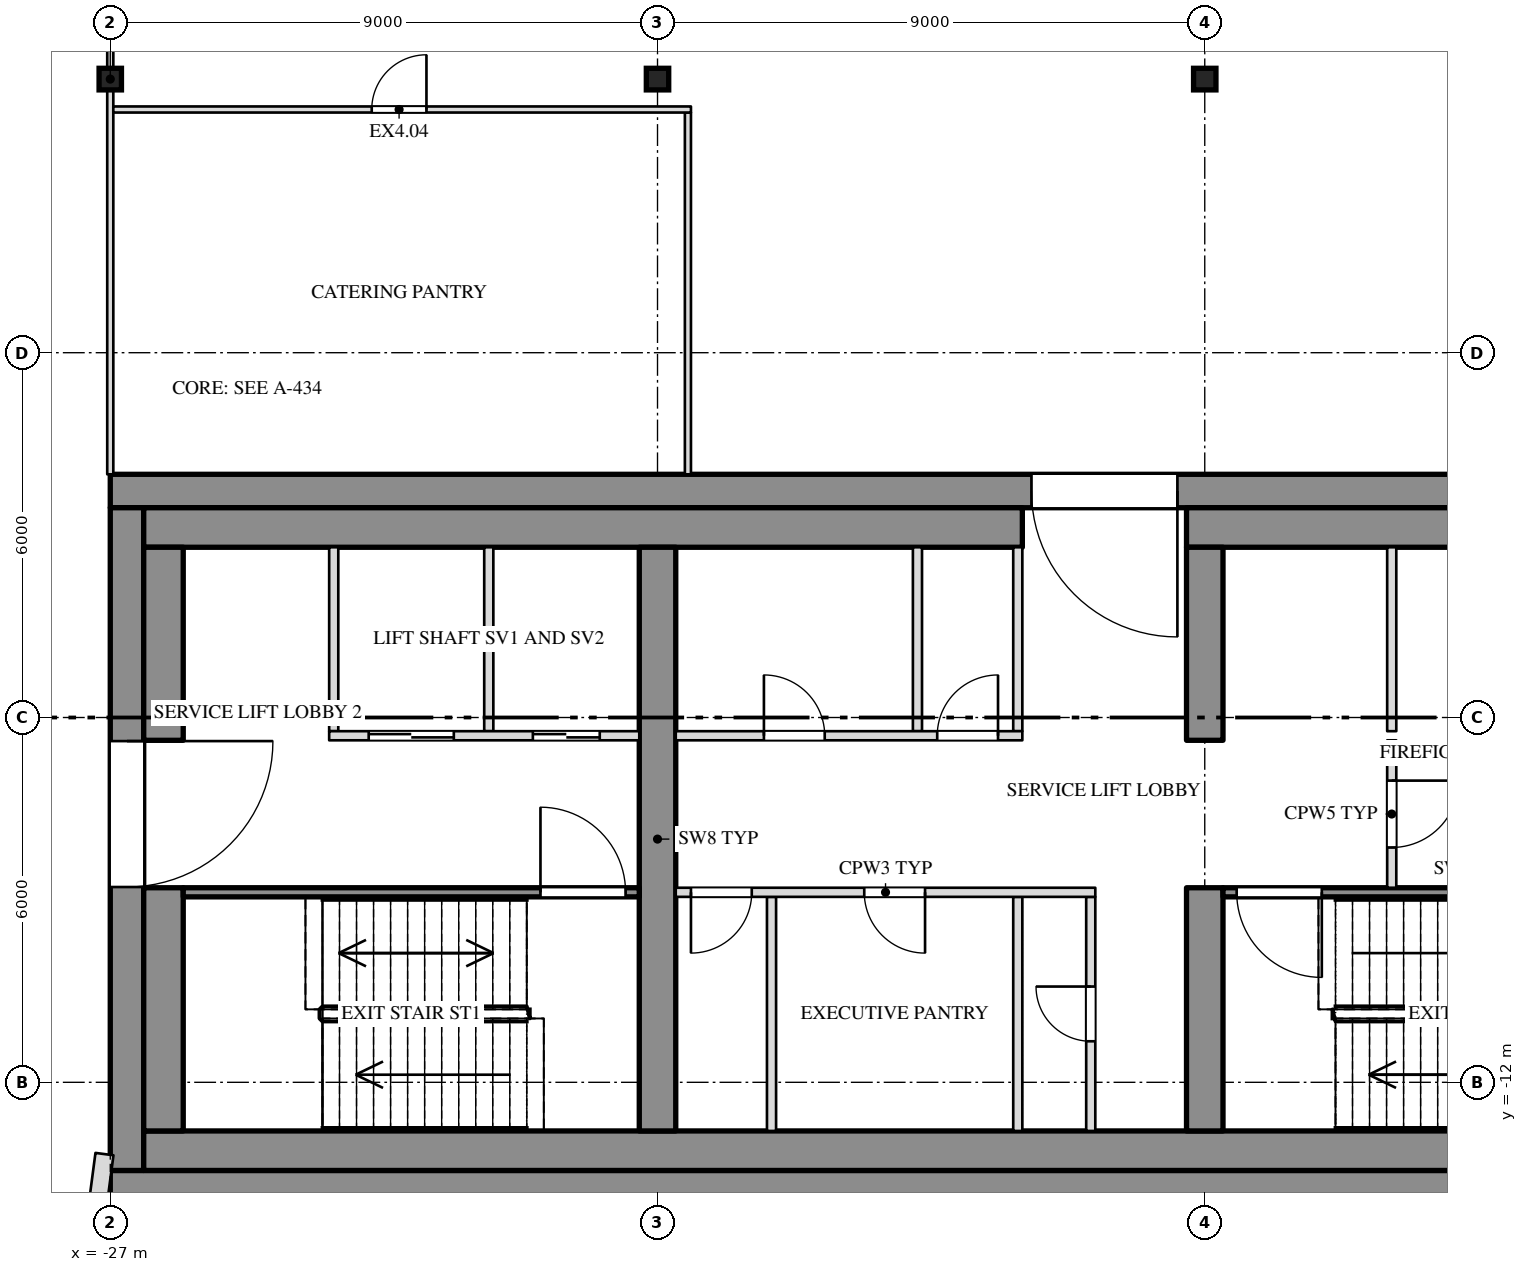
"""IFC4 building model, lengths in metres.
Left out: names, types, materials, properties, quantities, classifications, styles, units other than length and angle.
Written with IfcOpenShell. Run it as: python <this file> out.ifc"""

import sys

from ifc_helpers import new_model, si_unit, direction, frame, frame_2d, origin, origin_2d, place, context, subcontext, project, spatial, rectangle, i_section, extrude, element, fill, save


model = new_model("IFC4")
c1 = context("Model", 3, precision=1e-05, world=origin(), true_north=direction((0.0, 1.0)))
c2 = subcontext(c1, "Body", "Model", "MODEL_VIEW")
j1 = project(units=[si_unit("LENGTHUNIT", "METRE"), si_unit("PLANEANGLEUNIT", "RADIAN")], contexts=[c1])
p1 = place(None, origin())
s1 = spatial("IfcSite", under=j1, at=p1, CompositionType="ELEMENT")
p2 = place(p1, origin())
s2 = spatial("IfcBuilding", under=s1, at=p2, CompositionType="ELEMENT")
p3 = place(p2, frame((0.0, 0.0, 284.5)))
s3 = spatial("IfcBuildingStorey", under=s2, at=p3, CompositionType="ELEMENT", Elevation=284.5)
for number, where, z_axis, x_axis in (
    (1, (-27.0, 4.5, 0.0), (0.0, 0.0, 1.0), (1.0, 0.0, 0.0)),
    (2, (-18.0, 4.5, 0.0), (0.0, 0.0, 1.0), (1.0, 0.0, 0.0)),
    (3, (-9.0, 4.5, 0.0), (0.0, 0.0, 1.0), (1.0, 0.0, 0.0)),
):
    element("IfcColumn", number, at=place(p3, frame(where, z_axis=z_axis, x_axis=x_axis)), inside=s3, PredefinedType="COLUMN", context=c2, shape_type="SweptSolid", body=[
        extrude(i_section(OverallWidth=0.368, OverallDepth=0.356, WebThickness=0.011, FlangeThickness=0.018, at=origin_2d()), origin(), (0.0, 0.0, 1.0), 4.0),
    ])
p4 = place(p3, frame((-27.0, -2.275, 0.0), z_axis=(0.0, 0.0, 1.0), x_axis=(1.0, 0.0, 0.0)))
e4 = element("IfcWall", 4, at=p4, inside=s3, PredefinedType="SHEAR", context=c2, shape_type="SweptSolid", body=[
    extrude(rectangle(XDim=54.0, YDim=0.55, at=frame_2d((27.0, 0.0))), origin(), (0.0, 0.0, 1.0), 3.78),
])
p5 = place(p4, frame((15.15, 0.0, 0.0)))
e5 = element("IfcOpeningElement", 5, at=p5, cuts=e4, PredefinedType="OPENING", context=c2, shape_type="SweptSolid", body=[
    extrude(rectangle(XDim=2.4, YDim=2.1, at=frame_2d((1.2, 1.05))), frame((0.0, 0.287, 0.0), z_axis=(0.0, -1.0, 0.0), x_axis=(1.0, 0.0, 0.0)), (0.0, 0.0, 1.0), 0.574),
])
p6 = place(p4, frame((36.45, 0.0, 0.0)))
e6 = element("IfcOpeningElement", 6, at=p6, cuts=e4, PredefinedType="OPENING", context=c2, shape_type="SweptSolid", body=[
    extrude(rectangle(XDim=2.4, YDim=2.1, at=frame_2d((1.2, 1.05))), frame((0.0, 0.287, 0.0), z_axis=(0.0, -1.0, 0.0), x_axis=(1.0, 0.0, 0.0)), (0.0, 0.0, 1.0), 0.574),
])
p7 = place(p3, frame((-27.0, -13.725, 0.0), z_axis=(0.0, 0.0, 1.0), x_axis=(1.0, 0.0, 0.0)))
e7 = element("IfcWall", 7, at=p7, inside=s3, PredefinedType="SHEAR", context=c2, shape_type="SweptSolid", body=[
    extrude(rectangle(XDim=54.0, YDim=0.55, at=frame_2d((27.0, 0.0))), origin(), (0.0, 0.0, 1.0), 3.78),
])
p8 = place(p3, frame((-26.725, -13.45, 0.0), z_axis=(0.0, 0.0, 1.0), x_axis=(0.0, 1.0, 0.0)))
e8 = element("IfcWall", 8, at=p8, inside=s3, PredefinedType="SHEAR", context=c2, shape_type="SweptSolid", body=[
    extrude(rectangle(XDim=10.9, YDim=0.55, at=frame_2d((5.45, 0.0))), origin(), (0.0, 0.0, 1.0), 3.78),
])
p9 = place(p8, frame((4.662, 0.0, 0.0)))
e9 = element("IfcOpeningElement", 9, at=p9, cuts=e8, PredefinedType="OPENING", context=c2, shape_type="SweptSolid", body=[
    extrude(rectangle(XDim=2.4, YDim=2.1, at=frame_2d((1.2, 1.05))), frame((0.0, 0.287, 0.0), z_axis=(0.0, -1.0, 0.0), x_axis=(1.0, 0.0, 0.0)), (0.0, 0.0, 1.0), 0.574),
])
p10 = place(p3, frame((-26.45, -2.875, 0.0), z_axis=(0.0, 0.0, 1.0), x_axis=(1.0, 0.0, 0.0)))
e10 = element("IfcWall", 10, at=p10, inside=s3, PredefinedType="SHEAR", context=c2, shape_type="SweptSolid", body=[
    extrude(rectangle(XDim=14.45, YDim=0.65, at=frame_2d((7.225, 0.0))), origin(), (0.0, 0.0, 1.0), 3.78),
])
p11 = place(p3, frame((-9.3, -2.875, 0.0), z_axis=(0.0, 0.0, 1.0), x_axis=(1.0, 0.0, 0.0)))
e11 = element("IfcWall", 11, at=p11, inside=s3, PredefinedType="SHEAR", context=c2, shape_type="SweptSolid", body=[
    extrude(rectangle(XDim=18.6, YDim=0.65, at=frame_2d((9.3, 0.0))), origin(), (0.0, 0.0, 1.0), 3.78),
])
p12 = place(p3, frame((-26.45, -13.125, 0.0), z_axis=(0.0, 0.0, 1.0), x_axis=(1.0, 0.0, 0.0)))
e12 = element("IfcWall", 12, at=p12, inside=s3, PredefinedType="SHEAR", context=c2, shape_type="SweptSolid", body=[
    extrude(rectangle(XDim=52.9, YDim=0.65, at=frame_2d((26.45, 0.0))), origin(), (0.0, 0.0, 1.0), 3.78),
])
p13 = place(p3, frame((-26.125, -12.8, 0.0), z_axis=(0.0, 0.0, 1.0), x_axis=(0.0, 1.0, 0.0)))
e13 = element("IfcWall", 13, at=p13, inside=s3, PredefinedType="SHEAR", context=c2, shape_type="SweptSolid", body=[
    extrude(rectangle(XDim=4.0, YDim=0.65, at=frame_2d((2.0, 0.0))), origin(), (0.0, 0.0, 1.0), 3.78),
])
p14 = place(p3, frame((-26.125, -6.375, 0.0), z_axis=(0.0, 0.0, 1.0), x_axis=(0.0, 1.0, 0.0)))
e14 = element("IfcWall", 14, at=p14, inside=s3, PredefinedType="SHEAR", context=c2, shape_type="SweptSolid", body=[
    extrude(rectangle(XDim=3.175, YDim=0.65, at=frame_2d((1.587, 0.0))), origin(), (0.0, 0.0, 1.0), 3.78),
])
p15 = place(p3, frame((-18.0, -12.8, 0.0), z_axis=(0.0, 0.0, 1.0), x_axis=(0.0, 1.0, 0.0)))
e15 = element("IfcWall", 15, at=p15, inside=s3, PredefinedType="SHEAR", context=c2, shape_type="SweptSolid", body=[
    extrude(rectangle(XDim=9.6, YDim=0.6, at=frame_2d((4.8, 0.0))), origin(), (0.0, 0.0, 1.0), 3.78),
])
p16 = place(p3, frame((-9.0, -12.8, 0.0), z_axis=(0.0, 0.0, 1.0), x_axis=(0.0, 1.0, 0.0)))
e16 = element("IfcWall", 16, at=p16, inside=s3, PredefinedType="SHEAR", context=c2, shape_type="SweptSolid", body=[
    extrude(rectangle(XDim=4.0, YDim=0.6, at=frame_2d((2.0, 0.0))), origin(), (0.0, 0.0, 1.0), 3.78),
])
p17 = place(p3, frame((-9.0, -6.375, 0.0), z_axis=(0.0, 0.0, 1.0), x_axis=(0.0, 1.0, 0.0)))
e17 = element("IfcWall", 17, at=p17, inside=s3, PredefinedType="SHEAR", context=c2, shape_type="SweptSolid", body=[
    extrude(rectangle(XDim=3.175, YDim=0.6, at=frame_2d((1.587, 0.0))), origin(), (0.0, 0.0, 1.0), 3.78),
])
p18 = place(p3, frame((-27.0, -2.0, 0.0), z_axis=(0.0, 0.0, 1.0), x_axis=(0.0, 1.0, 0.0)))
e18 = element("IfcWall", 18, at=p18, inside=s3, PredefinedType="PARTITIONING", context=c2, shape_type="SweptSolid", body=[
    extrude(rectangle(XDim=6.322, YDim=0.1, at=frame_2d((3.161, 0.0))), origin(), (0.0, 0.0, 1.0), 3.247),
])
p19 = place(p3, frame((-27.0, 4.678, 0.0), z_axis=(0.0, 0.0, 1.0), x_axis=(0.0, 1.0, 0.0)))
e19 = element("IfcWall", 19, at=p19, inside=s3, PredefinedType="PARTITIONING", context=c2, shape_type="SweptSolid", body=[
    extrude(rectangle(XDim=1.902, YDim=0.1, at=frame_2d((0.951, 0.0))), origin(), (0.0, 0.0, 1.0), 3.247),
])
p20 = place(p3, frame((-17.5, -2.0, 0.0), z_axis=(0.0, 0.0, 1.0), x_axis=(0.0, 1.0, 0.0)))
e20 = element("IfcWall", 20, at=p20, inside=s3, PredefinedType="PARTITIONING", context=c2, shape_type="SweptSolid", body=[
    extrude(rectangle(XDim=5.95, YDim=0.1, at=frame_2d((2.975, 0.0))), origin(), (0.0, 0.0, 1.0), 3.78),
])
p21 = place(p3, frame((-26.95, 4.0, 0.0), z_axis=(0.0, 0.0, 1.0), x_axis=(1.0, 0.0, 0.0)))
e21 = element("IfcWall", 21, at=p21, inside=s3, PredefinedType="PARTITIONING", context=c2, shape_type="SweptSolid", body=[
    extrude(rectangle(XDim=9.5, YDim=0.1, at=frame_2d((4.75, 0.0))), origin(), (0.0, 0.0, 1.0), 3.78),
])
p22 = place(p21, frame((4.25, 0.0, 0.0)))
e22 = element("IfcOpeningElement", 22, at=p22, cuts=e21, PredefinedType="OPENING", context=c2, shape_type="SweptSolid", body=[
    extrude(rectangle(XDim=0.9, YDim=2.1, at=frame_2d((0.45, 1.05))), frame((0.0, 0.062, 0.0), z_axis=(0.0, -1.0, 0.0), x_axis=(1.0, 0.0, 0.0)), (0.0, 0.0, 1.0), 0.124),
])
p23 = place(p3, frame((-27.296, -13.558, 0.0), z_axis=(0.0, 0.0, 1.0), x_axis=(0.991398522068, -0.130877692682, 0.0)))
e23 = element("IfcWall", 23, at=p23, inside=s3, PredefinedType="SOLIDWALL", context=c2, shape_type="SweptSolid", body=[
    extrude(rectangle(XDim=0.299, YDim=0.8, at=frame_2d((0.149, 0.0))), origin(), (0.0, 0.0, 1.0), 3.78),
])
for number, where, z_axis, x_axis in (
    (24, (-20.775, -6.225, 0.0), (0.0, 0.0, 1.0), (0.0, 1.0, 0.0)),
    (25, (-23.325, -6.225, 0.0), (0.0, 0.0, 1.0), (0.0, 1.0, 0.0)),
    (26, (-12.075, -6.225, 0.0), (0.0, 0.0, 1.0), (0.0, 1.0, 0.0)),
    (27, (-13.725, -6.225, 0.0), (0.0, 0.0, 1.0), (0.0, 1.0, 0.0)),
    (28, (-5.925, -6.225, 0.0), (0.0, 0.0, 1.0), (0.0, 1.0, 0.0)),
):
    element("IfcWall", number, at=place(p3, frame(where, z_axis=z_axis, x_axis=x_axis)), inside=s3, PredefinedType="PARTITIONING", context=c2, shape_type="SweptSolid", body=[
        extrude(rectangle(XDim=3.025, YDim=0.15, at=frame_2d((1.513, 0.0))), origin(), (0.0, 0.0, 1.0), 3.78),
    ])
p24 = place(p3, frame((-10.875, -12.8, 0.0), z_axis=(0.0, 0.0, 1.0), x_axis=(0.0, 1.0, 0.0)))
e29 = element("IfcWall", 29, at=p24, inside=s3, PredefinedType="PARTITIONING", context=c2, shape_type="SweptSolid", body=[
    extrude(rectangle(XDim=3.85, YDim=0.15, at=frame_2d((1.925, 0.0))), origin(), (0.0, 0.0, 1.0), 3.78),
])
p25 = place(p24, frame((1.475, 0.0, 0.0)))
e30 = element("IfcOpeningElement", 30, at=p25, cuts=e29, PredefinedType="OPENING", context=c2, shape_type="SweptSolid", body=[
    extrude(rectangle(XDim=0.9, YDim=2.1, at=frame_2d((0.45, 1.05))), frame((0.0, 0.087, 0.0), z_axis=(0.0, -1.0, 0.0), x_axis=(1.0, 0.0, 0.0)), (0.0, 0.0, 1.0), 0.174),
])
for number, where, z_axis, x_axis in (
    (31, (-12.075, -12.8, 0.0), (0.0, 0.0, 1.0), (0.0, 1.0, 0.0)),
    (32, (-16.125, -12.8, 0.0), (0.0, 0.0, 1.0), (0.0, 1.0, 0.0)),
):
    element("IfcWall", number, at=place(p3, frame(where, z_axis=z_axis, x_axis=x_axis)), inside=s3, PredefinedType="PARTITIONING", context=c2, shape_type="SweptSolid", body=[
        extrude(rectangle(XDim=3.85, YDim=0.15, at=frame_2d((1.925, 0.0))), origin(), (0.0, 0.0, 1.0), 3.78),
    ])
p26 = place(p3, frame((-5.925, -8.8, 0.0), z_axis=(0.0, 0.0, 1.0), x_axis=(0.0, 1.0, 0.0)))
e33 = element("IfcWall", 33, at=p26, inside=s3, PredefinedType="PARTITIONING", context=c2, shape_type="SweptSolid", body=[
    extrude(rectangle(XDim=2.425, YDim=0.15, at=frame_2d((1.212, 0.0))), origin(), (0.0, 0.0, 1.0), 3.78),
])
p27 = place(p26, frame((0.662, 0.0, 0.0)))
e34 = element("IfcOpeningElement", 34, at=p27, cuts=e33, PredefinedType="OPENING", context=c2, shape_type="SweptSolid", body=[
    extrude(rectangle(XDim=1.1, YDim=2.1, at=frame_2d((0.55, 1.05))), frame((0.0, 0.087, 0.0), z_axis=(0.0, -1.0, 0.0), x_axis=(1.0, 0.0, 0.0)), (0.0, 0.0, 1.0), 0.174),
])
p28 = place(p3, frame((-23.4, -6.3, 0.0), z_axis=(0.0, 0.0, 1.0), x_axis=(1.0, 0.0, 0.0)))
e35 = element("IfcWall", 35, at=p28, inside=s3, PredefinedType="PARTITIONING", context=c2, shape_type="SweptSolid", body=[
    extrude(rectangle(XDim=5.1, YDim=0.15, at=frame_2d((2.55, 0.0))), origin(), (0.0, 0.0, 1.0), 3.78),
])
p29 = place(p28, frame((0.65, 0.0, 0.0)))
e36 = element("IfcOpeningElement", 36, at=p29, cuts=e35, PredefinedType="OPENING", context=c2, shape_type="SweptSolid", body=[
    extrude(rectangle(XDim=1.4, YDim=2.1, at=frame_2d((0.7, 1.05))), frame((0.0, 0.087, 0.0), z_axis=(0.0, -1.0, 0.0), x_axis=(1.0, 0.0, 0.0)), (0.0, 0.0, 1.0), 0.174),
])
p30 = place(p28, frame((3.35, 0.0, 0.0)))
e37 = element("IfcOpeningElement", 37, at=p30, cuts=e35, PredefinedType="OPENING", context=c2, shape_type="SweptSolid", body=[
    extrude(rectangle(XDim=1.1, YDim=2.1, at=frame_2d((0.55, 1.05))), frame((0.0, 0.087, 0.0), z_axis=(0.0, -1.0, 0.0), x_axis=(1.0, 0.0, 0.0)), (0.0, 0.0, 1.0), 0.174),
])
p31 = place(p3, frame((-17.7, -6.3, 0.0), z_axis=(0.0, 0.0, 1.0), x_axis=(1.0, 0.0, 0.0)))
e38 = element("IfcWall", 38, at=p31, inside=s3, PredefinedType="PARTITIONING", context=c2, shape_type="SweptSolid", body=[
    extrude(rectangle(XDim=5.7, YDim=0.15, at=frame_2d((2.85, 0.0))), origin(), (0.0, 0.0, 1.0), 3.78),
])
p32 = place(p31, frame((1.45, 0.0, 0.0)))
e39 = element("IfcOpeningElement", 39, at=p32, cuts=e38, PredefinedType="OPENING", context=c2, shape_type="SweptSolid", body=[
    extrude(rectangle(XDim=1.0, YDim=2.1, at=frame_2d((0.5, 1.05))), frame((0.0, 0.087, 0.0), z_axis=(0.0, -1.0, 0.0), x_axis=(1.0, 0.0, 0.0)), (0.0, 0.0, 1.0), 0.174),
])
p33 = place(p31, frame((4.3, 0.0, 0.0)))
e40 = element("IfcOpeningElement", 40, at=p33, cuts=e38, PredefinedType="OPENING", context=c2, shape_type="SweptSolid", body=[
    extrude(rectangle(XDim=1.0, YDim=2.1, at=frame_2d((0.5, 1.05))), frame((0.0, 0.087, 0.0), z_axis=(0.0, -1.0, 0.0), x_axis=(1.0, 0.0, 0.0)), (0.0, 0.0, 1.0), 0.174),
])
p34 = place(p3, frame((-25.8, -8.875, 0.0), z_axis=(0.0, 0.0, 1.0), x_axis=(1.0, 0.0, 0.0)))
e41 = element("IfcWall", 41, at=p34, inside=s3, PredefinedType="SHEAR", context=c2, shape_type="SweptSolid", body=[
    extrude(rectangle(XDim=7.5, YDim=0.15, at=frame_2d((3.75, 0.0))), origin(), (0.0, 0.0, 1.0), 3.78),
])
p35 = place(p34, frame((5.875, 0.0, 0.0)))
e42 = element("IfcOpeningElement", 42, at=p35, cuts=e41, PredefinedType="OPENING", context=c2, shape_type="SweptSolid", body=[
    extrude(rectangle(XDim=1.4, YDim=2.1, at=frame_2d((0.7, 1.05))), frame((0.0, 0.087, 0.0), z_axis=(0.0, -1.0, 0.0), x_axis=(1.0, 0.0, 0.0)), (0.0, 0.0, 1.0), 0.174),
])
p36 = place(p3, frame((-17.7, -8.875, 0.0), z_axis=(0.0, 0.0, 1.0), x_axis=(1.0, 0.0, 0.0)))
e43 = element("IfcWall", 43, at=p36, inside=s3, PredefinedType="PARTITIONING", context=c2, shape_type="SweptSolid", body=[
    extrude(rectangle(XDim=6.9, YDim=0.15, at=frame_2d((3.45, 0.0))), origin(), (0.0, 0.0, 1.0), 3.78),
])
p37 = place(p36, frame((0.25, 0.0, 0.0)))
e44 = element("IfcOpeningElement", 44, at=p37, cuts=e43, PredefinedType="OPENING", context=c2, shape_type="SweptSolid", body=[
    extrude(rectangle(XDim=1.0, YDim=2.1, at=frame_2d((0.5, 1.05))), frame((0.0, 0.087, 0.0), z_axis=(0.0, -1.0, 0.0), x_axis=(1.0, 0.0, 0.0)), (0.0, 0.0, 1.0), 0.174),
])
p38 = place(p36, frame((3.1, 0.0, 0.0)))
e45 = element("IfcOpeningElement", 45, at=p38, cuts=e43, PredefinedType="OPENING", context=c2, shape_type="SweptSolid", body=[
    extrude(rectangle(XDim=1.0, YDim=2.1, at=frame_2d((0.5, 1.05))), frame((0.0, 0.087, 0.0), z_axis=(0.0, -1.0, 0.0), x_axis=(1.0, 0.0, 0.0)), (0.0, 0.0, 1.0), 0.174),
])
p39 = place(p3, frame((-8.7, -8.875, 0.0), z_axis=(0.0, 0.0, 1.0), x_axis=(1.0, 0.0, 0.0)))
e46 = element("IfcWall", 46, at=p39, inside=s3, PredefinedType="SHEAR", context=c2, shape_type="SweptSolid", body=[
    extrude(rectangle(XDim=8.4, YDim=0.15, at=frame_2d((4.2, 0.0))), origin(), (0.0, 0.0, 1.0), 3.78),
])
p40 = place(p39, frame((0.225, 0.0, 0.0)))
e47 = element("IfcOpeningElement", 47, at=p40, cuts=e46, PredefinedType="OPENING", context=c2, shape_type="SweptSolid", body=[
    extrude(rectangle(XDim=1.4, YDim=2.1, at=frame_2d((0.7, 1.05))), frame((0.0, 0.087, 0.0), z_axis=(0.0, -1.0, 0.0), x_axis=(1.0, 0.0, 0.0)), (0.0, 0.0, 1.0), 0.174),
])
p41 = place(p22, origin())
e48 = element("IfcDoor", 48, at=p41, inside=s3, OperationType="SINGLE_SWING_RIGHT", PredefinedType="DOOR", context=c2, shape_type="SweptSolid", body=[
    extrude(rectangle(XDim=0.9, YDim=2.1, at=frame_2d((0.45, 1.05))), frame((0.0, 0.025, 0.0), z_axis=(0.0, -1.0, 0.0), x_axis=(1.0, 0.0, 0.0)), (0.0, 0.0, 1.0), 0.05),
])
fill(e22, e48)
p42 = place(p9, origin())
e49 = element("IfcDoor", 49, at=p42, inside=s3, OperationType="DOUBLE_DOOR_SINGLE_SWING", PredefinedType="DOOR", context=c2, shape_type="SweptSolid", body=[
    extrude(rectangle(XDim=2.4, YDim=2.1, at=frame_2d((1.2, 1.05))), frame((0.0, 0.025, 0.0), z_axis=(0.0, -1.0, 0.0), x_axis=(1.0, 0.0, 0.0)), (0.0, 0.0, 1.0), 0.05),
])
fill(e9, e49)
p43 = place(p29, origin())
e50 = element("IfcDoor", 50, at=p43, inside=s3, OperationType="SLIDING_TO_RIGHT", PredefinedType="DOOR", context=c2, shape_type="SweptSolid", body=[
    extrude(rectangle(XDim=1.4, YDim=2.1, at=frame_2d((0.7, 1.05))), frame((0.0, 0.025, 0.0), z_axis=(0.0, -1.0, 0.0), x_axis=(1.0, 0.0, 0.0)), (0.0, 0.0, 1.0), 0.05),
])
fill(e36, e50)
p44 = place(p30, origin())
e51 = element("IfcDoor", 51, at=p44, inside=s3, OperationType="SLIDING_TO_LEFT", PredefinedType="DOOR", context=c2, shape_type="SweptSolid", body=[
    extrude(rectangle(XDim=1.1, YDim=2.1, at=frame_2d((0.55, 1.05))), frame((0.0, 0.025, 0.0), z_axis=(0.0, -1.0, 0.0), x_axis=(1.0, 0.0, 0.0)), (0.0, 0.0, 1.0), 0.05),
])
fill(e37, e51)
p45 = place(p35, origin())
e52 = element("IfcDoor", 52, at=p45, inside=s3, OperationType="DOUBLE_DOOR_SINGLE_SWING", PredefinedType="DOOR", context=c2, shape_type="SweptSolid", body=[
    extrude(rectangle(XDim=1.4, YDim=2.1, at=frame_2d((0.7, 1.05))), frame((0.0, 0.025, 0.0), z_axis=(0.0, -1.0, 0.0), x_axis=(1.0, 0.0, 0.0)), (0.0, 0.0, 1.0), 0.05),
])
fill(e42, e52)
p46 = place(p37, origin())
e53 = element("IfcDoor", 53, at=p46, inside=s3, OperationType="SINGLE_SWING_RIGHT", PredefinedType="DOOR", context=c2, shape_type="SweptSolid", body=[
    extrude(rectangle(XDim=1.0, YDim=2.1, at=frame_2d((0.5, 1.05))), frame((0.0, 0.025, 0.0), z_axis=(0.0, -1.0, 0.0), x_axis=(1.0, 0.0, 0.0)), (0.0, 0.0, 1.0), 0.05),
])
fill(e44, e53)
p47 = place(p32, origin())
e54 = element("IfcDoor", 54, at=p47, inside=s3, OperationType="SINGLE_SWING_LEFT", PredefinedType="DOOR", context=c2, shape_type="SweptSolid", body=[
    extrude(rectangle(XDim=1.0, YDim=2.1, at=frame_2d((0.5, 1.05))), frame((0.0, 0.025, 0.0), z_axis=(0.0, -1.0, 0.0), x_axis=(1.0, 0.0, 0.0)), (0.0, 0.0, 1.0), 0.05),
])
fill(e39, e54)
p48 = place(p38, origin())
e55 = element("IfcDoor", 55, at=p48, inside=s3, OperationType="SINGLE_SWING_LEFT", PredefinedType="DOOR", context=c2, shape_type="SweptSolid", body=[
    extrude(rectangle(XDim=1.0, YDim=2.1, at=frame_2d((0.5, 1.05))), frame((0.0, 0.025, 0.0), z_axis=(0.0, -1.0, 0.0), x_axis=(1.0, 0.0, 0.0)), (0.0, 0.0, 1.0), 0.05),
])
fill(e45, e55)
p49 = place(p33, origin())
e56 = element("IfcDoor", 56, at=p49, inside=s3, OperationType="SINGLE_SWING_RIGHT", PredefinedType="DOOR", context=c2, shape_type="SweptSolid", body=[
    extrude(rectangle(XDim=1.0, YDim=2.1, at=frame_2d((0.5, 1.05))), frame((0.0, 0.025, 0.0), z_axis=(0.0, -1.0, 0.0), x_axis=(1.0, 0.0, 0.0)), (0.0, 0.0, 1.0), 0.05),
])
fill(e40, e56)
p50 = place(p25, origin())
e57 = element("IfcDoor", 57, at=p50, inside=s3, OperationType="SINGLE_SWING_RIGHT", PredefinedType="DOOR", context=c2, shape_type="SweptSolid", body=[
    extrude(rectangle(XDim=0.9, YDim=2.1, at=frame_2d((0.45, 1.05))), frame((0.0, 0.025, 0.0), z_axis=(0.0, -1.0, 0.0), x_axis=(1.0, 0.0, 0.0)), (0.0, 0.0, 1.0), 0.05),
])
fill(e30, e57)
p51 = place(p5, origin())
e58 = element("IfcDoor", 58, at=p51, inside=s3, OperationType="DOUBLE_DOOR_SINGLE_SWING", PredefinedType="DOOR", context=c2, shape_type="SweptSolid", body=[
    extrude(rectangle(XDim=2.4, YDim=2.1, at=frame_2d((1.2, 1.05))), frame((0.0, 0.025, 0.0), z_axis=(0.0, -1.0, 0.0), x_axis=(1.0, 0.0, 0.0)), (0.0, 0.0, 1.0), 0.05),
])
fill(e5, e58)
p52 = place(p40, origin())
e59 = element("IfcDoor", 59, at=p52, inside=s3, OperationType="DOUBLE_DOOR_SINGLE_SWING", PredefinedType="DOOR", context=c2, shape_type="SweptSolid", body=[
    extrude(rectangle(XDim=1.4, YDim=2.1, at=frame_2d((0.7, 1.05))), frame((0.0, 0.025, 0.0), z_axis=(0.0, -1.0, 0.0), x_axis=(1.0, 0.0, 0.0)), (0.0, 0.0, 1.0), 0.05),
])
fill(e47, e59)
p53 = place(p27, origin())
e60 = element("IfcDoor", 60, at=p53, inside=s3, OperationType="SINGLE_SWING_LEFT", PredefinedType="DOOR", context=c2, shape_type="SweptSolid", body=[
    extrude(rectangle(XDim=1.1, YDim=2.1, at=frame_2d((0.55, 1.05))), frame((0.0, 0.025, 0.0), z_axis=(0.0, -1.0, 0.0), x_axis=(1.0, 0.0, 0.0)), (0.0, 0.0, 1.0), 0.05),
])
fill(e34, e60)
save(model, sys.argv[1])
